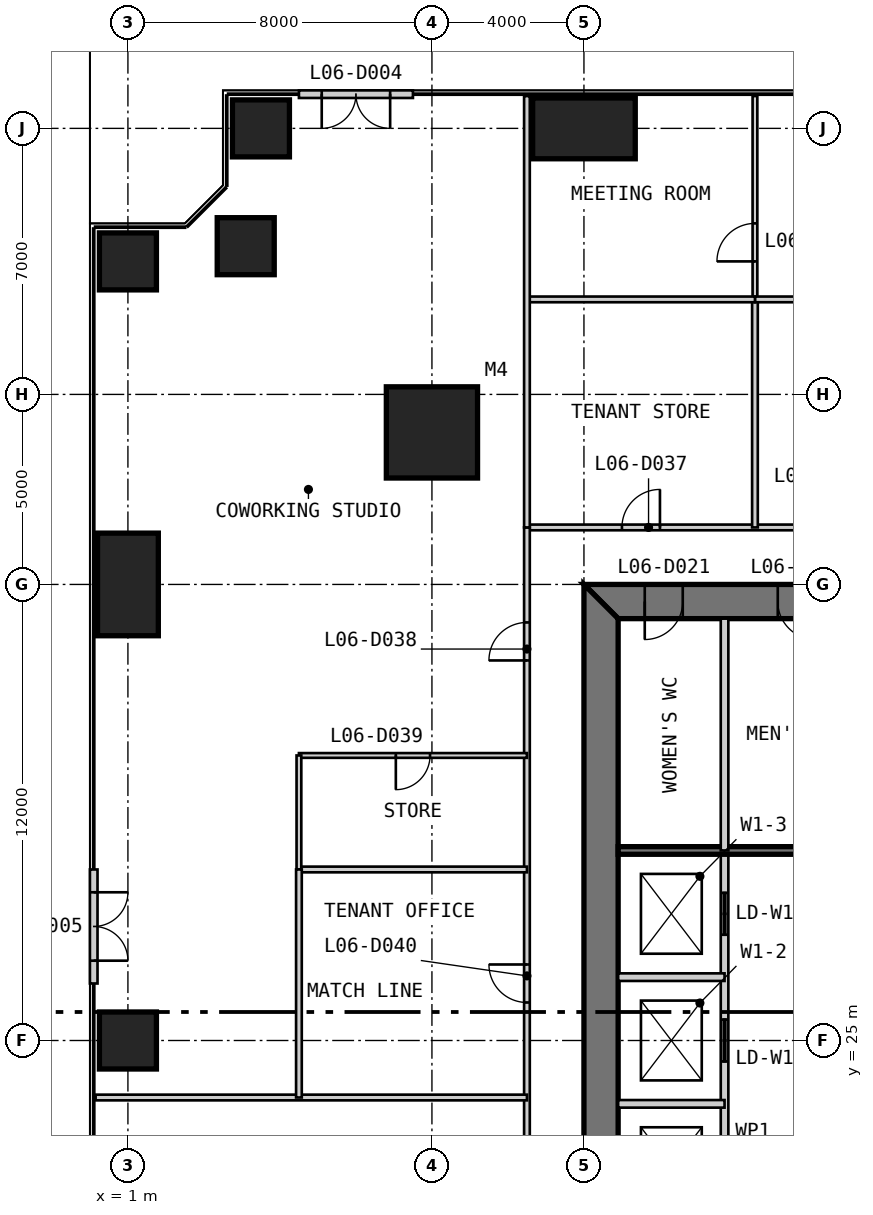
"""IFC4 building model, lengths in metres.
Left out: names, types, materials, properties, quantities, classifications, styles, units other than length and angle.
Written with IfcOpenShell. Run it as: python <this file> out.ifc"""

import sys

from ifc_helpers import new_model, si_unit, direction, frame, frame_2d, origin, origin_2d, place, context, subcontext, project, spatial, polyline, rectangle, outline, extrude, element, fill, save


model = new_model("IFC4")
c1 = context("Model", 3, precision=1e-05, world=origin(), true_north=direction((0.0, 1.0)))
c2 = subcontext(c1, "Body", "Model", "MODEL_VIEW")
j1 = project(units=[si_unit("LENGTHUNIT", "METRE"), si_unit("PLANEANGLEUNIT", "RADIAN")], contexts=[c1])
p1 = place(None, origin())
s1 = spatial("IfcSite", under=j1, at=p1, CompositionType="ELEMENT")
p2 = place(p1, origin())
s2 = spatial("IfcBuilding", under=s1, at=p2, CompositionType="ELEMENT")
p3 = place(p2, frame((0.0, 0.0, 31.0)))
s3 = spatial("IfcBuildingStorey", under=s2, at=p3, CompositionType="ELEMENT", Elevation=31.0)
p4 = place(p3, frame((9.0, 41.0, 0.0), z_axis=(0.0, 0.0, 1.0), x_axis=(1.0, 0.0, 0.0)))
e1 = element("IfcColumn", 1, at=p4, inside=s3, PredefinedType="COLUMN", context=c2, shape_type="SweptSolid", body=[
    extrude(rectangle(XDim=2.4, YDim=2.4, at=origin_2d()), origin(), (0.0, 0.0, 1.0), 4.0),
])
p5 = place(p3, frame((13.0, 49.0, 0.0), z_axis=(0.0, 0.0, 1.0), x_axis=(1.0, 0.0, 0.0)))
e2 = element("IfcColumn", 2, at=p5, inside=s3, PredefinedType="COLUMN", context=c2, shape_type="SweptSolid", body=[
    extrude(rectangle(XDim=2.7, YDim=1.6, at=origin_2d()), origin(), (0.0, 0.0, 1.0), 4.0),
])
for number, where, z_axis, x_axis in (
    (3, (4.5, 49.0, 0.0), (0.0, 0.0, 1.0), (1.0, 0.0, 0.0)),
    (4, (4.1, 45.9, 0.0), (0.0, 0.0, 1.0), (1.0, 0.0, 0.0)),
    (5, (1.0, 45.5, 0.0), (0.0, 0.0, 1.0), (1.0, 0.0, 0.0)),
):
    element("IfcColumn", number, at=place(p3, frame(where, z_axis=z_axis, x_axis=x_axis)), inside=s3, PredefinedType="COLUMN", context=c2, shape_type="SweptSolid", body=[
        extrude(rectangle(XDim=1.5, YDim=1.5, at=origin_2d()), origin(), (0.0, 0.0, 1.0), 4.0),
    ])
p6 = place(p3, frame((1.0, 37.0, 0.0), z_axis=(0.0, 0.0, 1.0), x_axis=(1.0, 0.0, 0.0)))
e6 = element("IfcColumn", 6, at=p6, inside=s3, PredefinedType="COLUMN", context=c2, shape_type="SweptSolid", body=[
    extrude(rectangle(XDim=1.6, YDim=2.7, at=origin_2d()), origin(), (0.0, 0.0, 1.0), 4.0),
])
p7 = place(p3, frame((1.0, 25.0, 0.0), z_axis=(0.0, 0.0, 1.0), x_axis=(1.0, 0.0, 0.0)))
e7 = element("IfcColumn", 7, at=p7, inside=s3, PredefinedType="COLUMN", context=c2, shape_type="SweptSolid", body=[
    extrude(rectangle(XDim=1.5, YDim=1.5, at=origin_2d()), origin(), (0.0, 0.0, 1.0), 4.0),
])
p8 = place(p3, frame((37.0, 36.55, 0.0), z_axis=(0.0, 0.0, 1.0), x_axis=(-1.0, 0.0, 0.0)))
e8 = element("IfcWall", 8, at=p8, inside=s3, PredefinedType="SHEAR", context=c2, shape_type="SweptSolid", body=[
    extrude(outline(polyline([(0.0, -0.45), (24.0, -0.45), (23.1, 0.45), (0.9, 0.45), (0.0, -0.45)])), origin(), (0.0, 0.0, 1.0), 4.0),
])
p9 = place(p8, frame((4.9, 0.0, 0.0)))
e9 = element("IfcOpeningElement", 9, at=p9, cuts=e8, PredefinedType="OPENING", context=c2, shape_type="SweptSolid", body=[
    extrude(rectangle(XDim=1.0, YDim=2.2, at=frame_2d((0.5, 1.1))), frame((0.0, 0.46, 0.0), z_axis=(0.0, -1.0, 0.0), x_axis=(1.0, 0.0, 0.0)), (0.0, 0.0, 1.0), 0.92),
])
p10 = place(p8, frame((8.9, 0.0, 0.0)))
e10 = element("IfcOpeningElement", 10, at=p10, cuts=e8, PredefinedType="OPENING", context=c2, shape_type="SweptSolid", body=[
    extrude(rectangle(XDim=1.1, YDim=2.2, at=frame_2d((0.55, 1.1))), frame((0.0, 0.46, 0.0), z_axis=(0.0, -1.0, 0.0), x_axis=(1.0, 0.0, 0.0)), (0.0, 0.0, 1.0), 0.92),
])
p11 = place(p8, frame((15.05, 0.0, 0.0)))
e11 = element("IfcOpeningElement", 11, at=p11, cuts=e8, PredefinedType="OPENING", context=c2, shape_type="SweptSolid", body=[
    extrude(rectangle(XDim=0.9, YDim=2.2, at=frame_2d((0.45, 1.1))), frame((0.0, 0.46, 0.0), z_axis=(0.0, -1.0, 0.0), x_axis=(1.0, 0.0, 0.0)), (0.0, 0.0, 1.0), 0.92),
])
p12 = place(p8, frame((17.9, 0.0, 0.0)))
e12 = element("IfcOpeningElement", 12, at=p12, cuts=e8, PredefinedType="OPENING", context=c2, shape_type="SweptSolid", body=[
    extrude(rectangle(XDim=1.0, YDim=2.2, at=frame_2d((0.5, 1.1))), frame((0.0, 0.46, 0.0), z_axis=(0.0, -1.0, 0.0), x_axis=(1.0, 0.0, 0.0)), (0.0, 0.0, 1.0), 0.92),
])
p13 = place(p8, frame((21.4, 0.0, 0.0)))
e13 = element("IfcOpeningElement", 13, at=p13, cuts=e8, PredefinedType="OPENING", context=c2, shape_type="SweptSolid", body=[
    extrude(rectangle(XDim=1.0, YDim=2.2, at=frame_2d((0.5, 1.1))), frame((0.0, 0.46, 0.0), z_axis=(0.0, -1.0, 0.0), x_axis=(1.0, 0.0, 0.0)), (0.0, 0.0, 1.0), 0.92),
])
p14 = place(p3, frame((13.45, 36.1, 0.0), z_axis=(0.0, 0.0, 1.0), x_axis=(0.0, -1.0, 0.0)))
e14 = element("IfcWall", 14, at=p14, inside=s3, PredefinedType="SHEAR", context=c2, shape_type="SweptSolid", body=[
    extrude(outline(polyline([(-0.9, -0.45), (23.1, -0.45), (22.2, 0.45), (0.0, 0.45), (-0.9, -0.45)])), origin(), (0.0, 0.0, 1.0), 4.0),
])
p15 = place(p14, frame((20.2, 0.0, 0.0)))
e15 = element("IfcOpeningElement", 15, at=p15, cuts=e14, PredefinedType="OPENING", context=c2, shape_type="SweptSolid", body=[
    extrude(rectangle(XDim=1.0, YDim=2.2, at=frame_2d((0.5, 1.1))), frame((0.0, 0.46, 0.0), z_axis=(0.0, -1.0, 0.0), x_axis=(1.0, 0.0, 0.0)), (0.0, 0.0, 1.0), 0.92),
])
p16 = place(p14, frame((17.25, 0.0, 0.0)))
e16 = element("IfcOpeningElement", 16, at=p16, cuts=e14, PredefinedType="OPENING", context=c2, shape_type="SweptSolid", body=[
    extrude(rectangle(XDim=0.9, YDim=2.2, at=frame_2d((0.45, 1.1))), frame((0.0, 0.46, 0.0), z_axis=(0.0, -1.0, 0.0), x_axis=(1.0, 0.0, 0.0)), (0.0, 0.0, 1.0), 0.92),
])
p17 = place(p3, frame((8.5, 49.9, 0.0), z_axis=(0.0, 0.0, 1.0), x_axis=(-1.0, 0.0, 0.0)))
e17 = element("IfcWall", 17, at=p17, inside=s3, PredefinedType="SOLIDWALL", context=c2, shape_type="SweptSolid", body=[
    extrude(rectangle(XDim=3.0, YDim=0.2, at=frame_2d((1.5, 0.0))), origin(), (0.0, 0.0, 1.0), 3.85),
])
p18 = place(p17, frame((0.6, 0.0, 0.0)))
e18 = element("IfcOpeningElement", 18, at=p18, cuts=e17, PredefinedType="OPENING", context=c2, shape_type="SweptSolid", body=[
    extrude(rectangle(XDim=1.8, YDim=2.4, at=frame_2d((0.9, 1.2))), frame((0.0, 0.11, 0.0), z_axis=(0.0, -1.0, 0.0), x_axis=(1.0, 0.0, 0.0)), (0.0, 0.0, 1.0), 0.22),
])
p19 = place(p3, frame((0.1, 29.5, 0.0), z_axis=(0.0, 0.0, 1.0), x_axis=(0.0, -1.0, 0.0)))
e19 = element("IfcWall", 19, at=p19, inside=s3, PredefinedType="SOLIDWALL", context=c2, shape_type="SweptSolid", body=[
    extrude(rectangle(XDim=3.0, YDim=0.2, at=frame_2d((1.5, 0.0))), origin(), (0.0, 0.0, 1.0), 3.85),
])
p20 = place(p19, frame((0.6, 0.0, 0.0)))
e20 = element("IfcOpeningElement", 20, at=p20, cuts=e19, PredefinedType="OPENING", context=c2, shape_type="SweptSolid", body=[
    extrude(rectangle(XDim=1.8, YDim=2.4, at=frame_2d((0.9, 1.2))), frame((0.0, 0.11, 0.0), z_axis=(0.0, -1.0, 0.0), x_axis=(1.0, 0.0, 0.0)), (0.0, 0.0, 1.0), 0.22),
])
p21 = place(p3, frame((16.7, 13.9, 0.0), z_axis=(0.0, 0.0, 1.0), x_axis=(0.0, 1.0, 0.0)))
e21 = element("IfcWall", 21, at=p21, inside=s3, PredefinedType="PARTITIONING", context=c2, shape_type="SweptSolid", body=[
    extrude(rectangle(XDim=16.1, YDim=0.2, at=frame_2d((8.05, 0.0))), origin(), (0.0, 0.0, 1.0), 3.8),
])
p22 = place(p21, frame((7.217, 0.0, 0.0)))
e22 = element("IfcOpeningElement", 22, at=p22, cuts=e21, PredefinedType="OPENING", context=c2, shape_type="SweptSolid", body=[
    extrude(rectangle(XDim=1.1, YDim=2.2, at=frame_2d((0.55, 1.1))), frame((0.0, 0.11, 0.0), z_axis=(0.0, -1.0, 0.0), x_axis=(1.0, 0.0, 0.0)), (0.0, 0.0, 1.0), 0.22),
])
p23 = place(p21, frame((10.55, 0.0, 0.0)))
e23 = element("IfcOpeningElement", 23, at=p23, cuts=e21, PredefinedType="OPENING", context=c2, shape_type="SweptSolid", body=[
    extrude(rectangle(XDim=1.1, YDim=2.2, at=frame_2d((0.55, 1.1))), frame((0.0, 0.11, 0.0), z_axis=(0.0, -1.0, 0.0), x_axis=(1.0, 0.0, 0.0)), (0.0, 0.0, 1.0), 0.22),
])
p24 = place(p21, frame((13.883, 0.0, 0.0)))
e24 = element("IfcOpeningElement", 24, at=p24, cuts=e21, PredefinedType="OPENING", context=c2, shape_type="SweptSolid", body=[
    extrude(rectangle(XDim=1.1, YDim=2.2, at=frame_2d((0.55, 1.1))), frame((0.0, 0.11, 0.0), z_axis=(0.0, -1.0, 0.0), x_axis=(1.0, 0.0, 0.0)), (0.0, 0.0, 1.0), 0.22),
])
for number, where, z_axis, x_axis in (
    (25, (13.9, 23.333, 0.0), (0.0, 0.0, 1.0), (1.0, 0.0, 0.0)),
    (26, (13.9, 26.667, 0.0), (0.0, 0.0, 1.0), (1.0, 0.0, 0.0)),
):
    element("IfcWall", number, at=place(p3, frame(where, z_axis=z_axis, x_axis=x_axis)), inside=s3, PredefinedType="PARTITIONING", context=c2, shape_type="SweptSolid", body=[
        extrude(rectangle(XDim=2.8, YDim=0.2, at=frame_2d((1.4, 0.0))), origin(), (0.0, 0.0, 1.0), 3.8),
    ])
p25 = place(p3, frame((29.7, 30.0, 0.0), z_axis=(0.0, 0.0, 1.0), x_axis=(-1.0, 0.0, 0.0)))
e27 = element("IfcWall", 27, at=p25, inside=s3, PredefinedType="SOLIDWALL", context=c2, shape_type="SweptSolid", body=[
    extrude(rectangle(XDim=15.8, YDim=0.2, at=frame_2d((7.9, 0.0))), origin(), (0.0, 0.0, 1.0), 3.8),
])
p26 = place(p3, frame((16.7, 36.1, 0.0), z_axis=(0.0, 0.0, 1.0), x_axis=(0.0, -1.0, 0.0)))
e28 = element("IfcWall", 28, at=p26, inside=s3, PredefinedType="PARTITIONING", context=c2, shape_type="SweptSolid", body=[
    extrude(rectangle(XDim=6.1, YDim=0.2, at=frame_2d((3.05, 0.0))), origin(), (0.0, 0.0, 1.0), 3.8),
])
p27 = place(p3, frame((38.5, 38.5, 0.0), z_axis=(0.0, 0.0, 1.0), x_axis=(-1.0, 0.0, 0.0)))
e29 = element("IfcWall", 29, at=p27, inside=s3, PredefinedType="PARTITIONING", context=c2, shape_type="SweptSolid", body=[
    extrude(rectangle(XDim=27.0, YDim=0.15, at=frame_2d((13.5, 0.0))), origin(), (0.0, 0.0, 1.0), 3.85),
])
p28 = place(p27, frame((5.5, 0.0, 0.0)))
e30 = element("IfcOpeningElement", 30, at=p28, cuts=e29, PredefinedType="OPENING", context=c2, shape_type="SweptSolid", body=[
    extrude(rectangle(XDim=1.0, YDim=2.2, at=frame_2d((0.5, 1.1))), frame((0.0, 0.085, 0.0), z_axis=(0.0, -1.0, 0.0), x_axis=(1.0, 0.0, 0.0)), (0.0, 0.0, 1.0), 0.17),
])
p29 = place(p27, frame((17.5, 0.0, 0.0)))
e31 = element("IfcOpeningElement", 31, at=p29, cuts=e29, PredefinedType="OPENING", context=c2, shape_type="SweptSolid", body=[
    extrude(rectangle(XDim=1.0, YDim=2.2, at=frame_2d((0.5, 1.1))), frame((0.0, 0.085, 0.0), z_axis=(0.0, -1.0, 0.0), x_axis=(1.0, 0.0, 0.0)), (0.0, 0.0, 1.0), 0.17),
])
p30 = place(p27, frame((23.5, 0.0, 0.0)))
e32 = element("IfcOpeningElement", 32, at=p30, cuts=e29, PredefinedType="OPENING", context=c2, shape_type="SweptSolid", body=[
    extrude(rectangle(XDim=1.0, YDim=2.2, at=frame_2d((0.5, 1.1))), frame((0.0, 0.085, 0.0), z_axis=(0.0, -1.0, 0.0), x_axis=(1.0, 0.0, 0.0)), (0.0, 0.0, 1.0), 0.17),
])
p31 = place(p3, frame((17.5, 49.85, 0.0), z_axis=(0.0, 0.0, 1.0), x_axis=(0.0, -1.0, 0.0)))
e33 = element("IfcWall", 33, at=p31, inside=s3, PredefinedType="PARTITIONING", context=c2, shape_type="SweptSolid", body=[
    extrude(rectangle(XDim=5.35, YDim=0.125, at=frame_2d((2.675, 0.0))), origin(), (0.0, 0.0, 1.0), 3.85),
])
p32 = place(p31, frame((3.35, 0.0, 0.0)))
e34 = element("IfcOpeningElement", 34, at=p32, cuts=e33, PredefinedType="OPENING", context=c2, shape_type="SweptSolid", body=[
    extrude(rectangle(XDim=1.0, YDim=2.2, at=frame_2d((0.5, 1.1))), frame((0.0, 0.073, 0.0), z_axis=(0.0, -1.0, 0.0), x_axis=(1.0, 0.0, 0.0)), (0.0, 0.0, 1.0), 0.145),
])
for number, where, z_axis, x_axis in (
    (35, (17.5, 44.5, 0.0), (0.0, 0.0, 1.0), (0.0, -1.0, 0.0)),
    (36, (23.5, 44.5, 0.0), (0.0, 0.0, 1.0), (-1.0, 0.0, 0.0)),
    (37, (17.5, 44.5, 0.0), (0.0, 0.0, 1.0), (-1.0, 0.0, 0.0)),
):
    element("IfcWall", number, at=place(p3, frame(where, z_axis=z_axis, x_axis=x_axis)), inside=s3, PredefinedType="PARTITIONING", context=c2, shape_type="SweptSolid", body=[
        extrude(rectangle(XDim=6.0, YDim=0.15, at=frame_2d((3.0, 0.0))), origin(), (0.0, 0.0, 1.0), 3.85),
    ])
p33 = place(p3, frame((11.5, 38.5, 0.0), z_axis=(0.0, 0.0, 1.0), x_axis=(0.0, -1.0, 0.0)))
e38 = element("IfcWall", 38, at=p33, inside=s3, PredefinedType="PARTITIONING", context=c2, shape_type="SweptSolid", body=[
    extrude(rectangle(XDim=27.0, YDim=0.15, at=frame_2d((13.5, 0.0))), origin(), (0.0, 0.0, 1.0), 3.85),
])
p34 = place(p33, frame((2.5, 0.0, 0.0)))
e39 = element("IfcOpeningElement", 39, at=p34, cuts=e38, PredefinedType="OPENING", context=c2, shape_type="SweptSolid", body=[
    extrude(rectangle(XDim=1.0, YDim=2.2, at=frame_2d((0.5, 1.1))), frame((0.0, 0.085, 0.0), z_axis=(0.0, -1.0, 0.0), x_axis=(1.0, 0.0, 0.0)), (0.0, 0.0, 1.0), 0.17),
])
p35 = place(p33, frame((11.5, 0.0, 0.0)))
e40 = element("IfcOpeningElement", 40, at=p35, cuts=e38, PredefinedType="OPENING", context=c2, shape_type="SweptSolid", body=[
    extrude(rectangle(XDim=1.0, YDim=2.2, at=frame_2d((0.5, 1.1))), frame((0.0, 0.085, 0.0), z_axis=(0.0, -1.0, 0.0), x_axis=(1.0, 0.0, 0.0)), (0.0, 0.0, 1.0), 0.17),
])
p36 = place(p33, frame((17.5, 0.0, 0.0)))
e41 = element("IfcOpeningElement", 41, at=p36, cuts=e38, PredefinedType="OPENING", context=c2, shape_type="SweptSolid", body=[
    extrude(rectangle(XDim=1.0, YDim=2.2, at=frame_2d((0.5, 1.1))), frame((0.0, 0.085, 0.0), z_axis=(0.0, -1.0, 0.0), x_axis=(1.0, 0.0, 0.0)), (0.0, 0.0, 1.0), 0.17),
])
p37 = place(p33, frame((22.0, 0.0, 0.0)))
e42 = element("IfcOpeningElement", 42, at=p37, cuts=e38, PredefinedType="OPENING", context=c2, shape_type="SweptSolid", body=[
    extrude(rectangle(XDim=1.0, YDim=2.2, at=frame_2d((0.5, 1.1))), frame((0.0, 0.085, 0.0), z_axis=(0.0, -1.0, 0.0), x_axis=(1.0, 0.0, 0.0)), (0.0, 0.0, 1.0), 0.17),
])
p38 = place(p33, frame((25.0, 0.0, 0.0)))
e43 = element("IfcOpeningElement", 43, at=p38, cuts=e38, PredefinedType="OPENING", context=c2, shape_type="SweptSolid", body=[
    extrude(rectangle(XDim=1.0, YDim=2.2, at=frame_2d((0.5, 1.1))), frame((0.0, 0.085, 0.0), z_axis=(0.0, -1.0, 0.0), x_axis=(1.0, 0.0, 0.0)), (0.0, 0.0, 1.0), 0.17),
])
p39 = place(p3, frame((11.5, 49.85, 0.0), z_axis=(0.0, 0.0, 1.0), x_axis=(0.0, -1.0, 0.0)))
e44 = element("IfcWall", 44, at=p39, inside=s3, PredefinedType="PARTITIONING", context=c2, shape_type="SweptSolid", body=[
    extrude(rectangle(XDim=11.35, YDim=0.15, at=frame_2d((5.675, 0.0))), origin(), (0.0, 0.0, 1.0), 3.85),
])
p40 = place(p3, frame((5.5, 32.5, 0.0), z_axis=(0.0, 0.0, 1.0), x_axis=(1.0, 0.0, 0.0)))
e45 = element("IfcWall", 45, at=p40, inside=s3, PredefinedType="PARTITIONING", context=c2, shape_type="SweptSolid", body=[
    extrude(rectangle(XDim=6.0, YDim=0.125, at=frame_2d((3.0, 0.0))), origin(), (0.0, 0.0, 1.0), 3.85),
])
p41 = place(p40, frame((2.55, 0.0, 0.0)))
e46 = element("IfcOpeningElement", 46, at=p41, cuts=e45, PredefinedType="OPENING", context=c2, shape_type="SweptSolid", body=[
    extrude(rectangle(XDim=0.9, YDim=2.2, at=frame_2d((0.45, 1.1))), frame((0.0, 0.073, 0.0), z_axis=(0.0, -1.0, 0.0), x_axis=(1.0, 0.0, 0.0)), (0.0, 0.0, 1.0), 0.145),
])
p42 = place(p3, frame((5.5, 29.5, 0.0), z_axis=(0.0, 0.0, 1.0), x_axis=(1.0, 0.0, 0.0)))
e47 = element("IfcWall", 47, at=p42, inside=s3, PredefinedType="PARTITIONING", context=c2, shape_type="SweptSolid", body=[
    extrude(rectangle(XDim=6.0, YDim=0.15, at=frame_2d((3.0, 0.0))), origin(), (0.0, 0.0, 1.0), 3.85),
])
p43 = place(p3, frame((0.15, 23.5, 0.0), z_axis=(0.0, 0.0, 1.0), x_axis=(1.0, 0.0, 0.0)))
e48 = element("IfcWall", 48, at=p43, inside=s3, PredefinedType="PARTITIONING", context=c2, shape_type="SweptSolid", body=[
    extrude(rectangle(XDim=11.35, YDim=0.15, at=frame_2d((5.675, 0.0))), origin(), (0.0, 0.0, 1.0), 3.85),
])
p44 = place(p3, frame((5.5, 32.5, 0.0), z_axis=(0.0, 0.0, 1.0), x_axis=(0.0, -1.0, 0.0)))
e49 = element("IfcWall", 49, at=p44, inside=s3, PredefinedType="PARTITIONING", context=c2, shape_type="SweptSolid", body=[
    extrude(rectangle(XDim=3.0, YDim=0.125, at=frame_2d((1.5, 0.0))), origin(), (0.0, 0.0, 1.0), 3.85),
])
p45 = place(p3, frame((5.5, 29.5, 0.0), z_axis=(0.0, 0.0, 1.0), x_axis=(0.0, -1.0, 0.0)))
e50 = element("IfcWall", 50, at=p45, inside=s3, PredefinedType="PARTITIONING", context=c2, shape_type="SweptSolid", body=[
    extrude(rectangle(XDim=6.0, YDim=0.15, at=frame_2d((3.0, 0.0))), origin(), (0.0, 0.0, 1.0), 3.85),
])
p46 = place(p18, origin())
e51 = element("IfcDoor", 51, at=p46, inside=s3, OperationType="DOUBLE_DOOR_SINGLE_SWING", PredefinedType="DOOR", context=c2, shape_type="SweptSolid", body=[
    extrude(rectangle(XDim=1.8, YDim=2.4, at=frame_2d((0.9, 1.2))), frame((0.0, 0.025, 0.0), z_axis=(0.0, -1.0, 0.0), x_axis=(1.0, 0.0, 0.0)), (0.0, 0.0, 1.0), 0.05),
])
fill(e18, e51)
p47 = place(p20, origin())
e52 = element("IfcDoor", 52, at=p47, inside=s3, OperationType="DOUBLE_DOOR_SINGLE_SWING", PredefinedType="DOOR", context=c2, shape_type="SweptSolid", body=[
    extrude(rectangle(XDim=1.8, YDim=2.4, at=frame_2d((0.9, 1.2))), frame((0.0, 0.025, 0.0), z_axis=(0.0, -1.0, 0.0), x_axis=(1.0, 0.0, 0.0)), (0.0, 0.0, 1.0), 0.05),
])
fill(e20, e52)
p48 = place(p12, origin())
e53 = element("IfcDoor", 53, at=p48, inside=s3, OperationType="SINGLE_SWING_LEFT", PredefinedType="DOOR", context=c2, shape_type="SweptSolid", body=[
    extrude(rectangle(XDim=1.0, YDim=2.2, at=frame_2d((0.5, 1.1))), frame((0.0, 0.025, 0.0), z_axis=(0.0, -1.0, 0.0), x_axis=(1.0, 0.0, 0.0)), (0.0, 0.0, 1.0), 0.05),
    extrude(outline(polyline([(0.0, 0.0), (0.04, 0.0), (0.04, 2.16), (0.96, 2.16), (0.96, 0.0), (1.0, 0.0), (1.0, 2.2), (0.0, 2.2), (0.0, 0.0)])), frame((0.0, 0.3, 0.0), z_axis=(0.0, -1.0, 0.0), x_axis=(1.0, 0.0, 0.0)), (0.0, 0.0, 1.0), 0.6),
])
fill(e12, e53)
p49 = place(p13, origin())
e54 = element("IfcDoor", 54, at=p49, inside=s3, OperationType="SINGLE_SWING_RIGHT", PredefinedType="DOOR", context=c2, shape_type="SweptSolid", body=[
    extrude(rectangle(XDim=1.0, YDim=2.2, at=frame_2d((0.5, 1.1))), frame((0.0, 0.025, 0.0), z_axis=(0.0, -1.0, 0.0), x_axis=(1.0, 0.0, 0.0)), (0.0, 0.0, 1.0), 0.05),
    extrude(outline(polyline([(0.0, 0.0), (0.04, 0.0), (0.04, 2.16), (0.96, 2.16), (0.96, 0.0), (1.0, 0.0), (1.0, 2.2), (0.0, 2.2), (0.0, 0.0)])), frame((0.0, 0.3, 0.0), z_axis=(0.0, -1.0, 0.0), x_axis=(1.0, 0.0, 0.0)), (0.0, 0.0, 1.0), 0.6),
])
fill(e13, e54)
p50 = place(p32, frame((1.0, 0.0, 0.0), z_axis=(0.0, 0.0, 1.0), x_axis=(-1.0, 0.0, 0.0)))
e55 = element("IfcDoor", 55, at=p50, inside=s3, OperationType="SINGLE_SWING_LEFT", PredefinedType="DOOR", context=c2, shape_type="SweptSolid", body=[
    extrude(rectangle(XDim=1.0, YDim=2.2, at=frame_2d((0.5, 1.1))), frame((0.0, 0.025, 0.0), z_axis=(0.0, -1.0, 0.0), x_axis=(1.0, 0.0, 0.0)), (0.0, 0.0, 1.0), 0.05),
])
fill(e34, e55)
p51 = place(p30, frame((1.0, 0.0, 0.0), z_axis=(0.0, 0.0, 1.0), x_axis=(-1.0, 0.0, 0.0)))
e56 = element("IfcDoor", 56, at=p51, inside=s3, OperationType="SINGLE_SWING_RIGHT", PredefinedType="DOOR", context=c2, shape_type="SweptSolid", body=[
    extrude(rectangle(XDim=1.0, YDim=2.2, at=frame_2d((0.5, 1.1))), frame((0.0, 0.025, 0.0), z_axis=(0.0, -1.0, 0.0), x_axis=(1.0, 0.0, 0.0)), (0.0, 0.0, 1.0), 0.05),
])
fill(e32, e56)
p52 = place(p34, frame((1.0, 0.0, 0.0), z_axis=(0.0, 0.0, 1.0), x_axis=(-1.0, 0.0, 0.0)))
e57 = element("IfcDoor", 57, at=p52, inside=s3, OperationType="SINGLE_SWING_LEFT", PredefinedType="DOOR", context=c2, shape_type="SweptSolid", body=[
    extrude(rectangle(XDim=1.0, YDim=2.2, at=frame_2d((0.5, 1.1))), frame((0.0, 0.025, 0.0), z_axis=(0.0, -1.0, 0.0), x_axis=(1.0, 0.0, 0.0)), (0.0, 0.0, 1.0), 0.05),
])
fill(e39, e57)
p53 = place(p41, frame((0.9, 0.0, 0.0), z_axis=(0.0, 0.0, 1.0), x_axis=(-1.0, 0.0, 0.0)))
e58 = element("IfcDoor", 58, at=p53, inside=s3, OperationType="SINGLE_SWING_RIGHT", PredefinedType="DOOR", context=c2, shape_type="SweptSolid", body=[
    extrude(rectangle(XDim=0.9, YDim=2.2, at=frame_2d((0.45, 1.1))), frame((0.0, 0.025, 0.0), z_axis=(0.0, -1.0, 0.0), x_axis=(1.0, 0.0, 0.0)), (0.0, 0.0, 1.0), 0.05),
])
fill(e46, e58)
p54 = place(p35, frame((1.0, 0.0, 0.0), z_axis=(0.0, 0.0, 1.0), x_axis=(-1.0, 0.0, 0.0)))
e59 = element("IfcDoor", 59, at=p54, inside=s3, OperationType="SINGLE_SWING_RIGHT", PredefinedType="DOOR", context=c2, shape_type="SweptSolid", body=[
    extrude(rectangle(XDim=1.0, YDim=2.2, at=frame_2d((0.5, 1.1))), frame((0.0, 0.025, 0.0), z_axis=(0.0, -1.0, 0.0), x_axis=(1.0, 0.0, 0.0)), (0.0, 0.0, 1.0), 0.05),
])
fill(e40, e59)
p55 = place(p23, origin())
e60 = element("IfcDoor", 60, at=p55, inside=s3, OperationType="DOUBLE_DOOR_SLIDING", PredefinedType="DOOR", context=c2, shape_type="SweptSolid", body=[
    extrude(rectangle(XDim=1.1, YDim=2.2, at=frame_2d((0.55, 1.1))), frame((0.0, 0.025, 0.0), z_axis=(0.0, -1.0, 0.0), x_axis=(1.0, 0.0, 0.0)), (0.0, 0.0, 1.0), 0.05),
])
fill(e23, e60)
p56 = place(p24, origin())
e61 = element("IfcDoor", 61, at=p56, inside=s3, OperationType="DOUBLE_DOOR_SLIDING", PredefinedType="DOOR", context=c2, shape_type="SweptSolid", body=[
    extrude(rectangle(XDim=1.1, YDim=2.2, at=frame_2d((0.55, 1.1))), frame((0.0, 0.025, 0.0), z_axis=(0.0, -1.0, 0.0), x_axis=(1.0, 0.0, 0.0)), (0.0, 0.0, 1.0), 0.05),
])
fill(e24, e61)
save(model, sys.argv[1])
